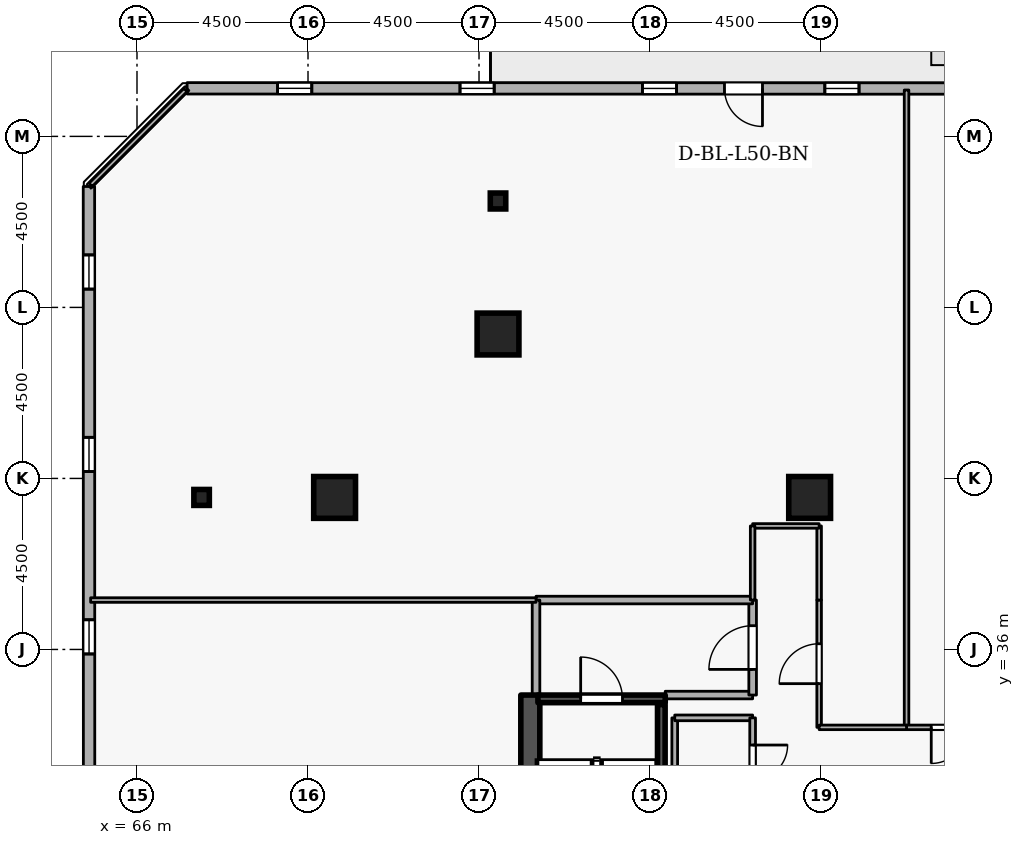
"""IFC4 building model, lengths in metres.
Left out: names, types, materials, properties, quantities, classifications, styles, units other than length and angle.
Written with IfcOpenShell. Run it as: python <this file> out.ifc"""

import sys

from ifc_helpers import new_model, si_unit, direction, frame, frame_2d, origin, origin_2d, place, context, subcontext, project, spatial, rectangle, i_section, extrude, element, fill, save


model = new_model("IFC4")
c1 = context("Model", 3, precision=1e-05, world=origin(), true_north=direction((0.0, 1.0)))
c2 = subcontext(c1, "Body", "Model", "MODEL_VIEW")
j1 = project(units=[si_unit("LENGTHUNIT", "METRE"), si_unit("PLANEANGLEUNIT", "RADIAN")], contexts=[c1])
p1 = place(None, origin())
s1 = spatial("IfcSite", under=j1, at=p1, CompositionType="ELEMENT")
p2 = place(p1, origin())
s2 = spatial("IfcBuilding", under=s1, at=p2, CompositionType="ELEMENT")
p3 = place(p2, frame((0.0, 0.0, 189.3)))
s3 = spatial("IfcBuildingStorey", under=s2, at=p3, CompositionType="ELEMENT", Elevation=189.3)
p4 = place(p3, frame((76.35, 19.2, 0.0), z_axis=(0.0, 0.0, 1.0), x_axis=(0.0, 1.0, 0.0)))
e1 = element("IfcWall", 1, at=p4, inside=s3, PredefinedType="SHEAR", context=c2, shape_type="SweptSolid", body=[
    extrude(rectangle(XDim=15.6, YDim=0.5, at=frame_2d((7.8, 0.0))), origin(), (0.0, 0.0, 1.0), 3.6),
])
for number, where, z_axis, x_axis in (
    (2, (75.5, 44.3, 0.0), (0.0, 0.0, 1.0), (1.0, 0.0, 0.0)),
    (3, (71.2, 40.0, 0.0), (0.0, 0.0, 1.0), (1.0, 0.0, 0.0)),
    (4, (83.7, 40.0, 0.0), (0.0, 0.0, 1.0), (1.0, 0.0, 0.0)),
):
    element("IfcColumn", number, at=place(p3, frame(where, z_axis=z_axis, x_axis=x_axis)), inside=s3, PredefinedType="COLUMN", context=c2, shape_type="SweptSolid", body=[
        extrude(rectangle(XDim=1.1, YDim=1.1, at=origin_2d()), origin(), (0.0, 0.0, 1.0), 3.6),
    ])
for number, where, z_axis, x_axis in (
    (5, (75.5, 47.8, 0.0), (0.0, 0.0, 1.0), (1.0, 0.0, 0.0)),
    (6, (67.7, 40.0, 0.0), (0.0, 0.0, 1.0), (1.0, 0.0, 0.0)),
):
    element("IfcColumn", number, at=place(p3, frame(where, z_axis=z_axis, x_axis=x_axis)), inside=s3, PredefinedType="COLUMN", context=c2, shape_type="SweptSolid", body=[
        extrude(i_section(OverallWidth=0.407, OverallDepth=0.419, WebThickness=0.031, FlangeThickness=0.049, FilletRadius=0.015, at=origin_2d()), origin(), (0.0, 0.0, 1.0), 3.6),
    ])
p5 = place(p3, frame((101.199, 50.756, 0.0), z_axis=(0.0, 0.0, 1.0), x_axis=(-0.999999969988, 0.000244999128, 0.0)))
e7 = element("IfcWall", 7, at=p5, inside=s3, PredefinedType="STANDARD", context=c2, shape_type="SweptSolid", body=[
    extrude(rectangle(XDim=33.881, YDim=0.3, at=frame_2d((16.94, 0.0))), origin(), (0.0, 0.0, 1.0), 2.7),
])
p6 = place(p5, frame((18.74, 0.0, 0.0)))
e8 = element("IfcOpeningElement", 8, at=p6, cuts=e7, PredefinedType="OPENING", context=c2, shape_type="SweptSolid", body=[
    extrude(rectangle(XDim=1.0, YDim=2.08, at=frame_2d((0.5, 1.04))), frame((0.0, 0.16, 0.0), z_axis=(0.0, -1.0, 0.0), x_axis=(1.0, 0.0, 0.0)), (0.0, 0.0, 1.0), 0.32),
])
p7 = place(p5, frame((1.8, 0.0, 0.72)))
e9 = element("IfcOpeningElement", 9, at=p7, cuts=e7, PredefinedType="OPENING", context=c2, shape_type="SweptSolid", body=[
    extrude(rectangle(XDim=0.9, YDim=1.75, at=frame_2d((0.45, 0.875))), frame((0.0, 0.16, 0.0), z_axis=(0.0, -1.0, 0.0), x_axis=(1.0, 0.0, 0.0)), (0.0, 0.0, 1.0), 0.32),
])
p8 = place(p5, frame((6.6, 0.0, 0.72)))
e10 = element("IfcOpeningElement", 10, at=p8, cuts=e7, PredefinedType="OPENING", context=c2, shape_type="SweptSolid", body=[
    extrude(rectangle(XDim=0.9, YDim=1.75, at=frame_2d((0.45, 0.875))), frame((0.0, 0.16, 0.0), z_axis=(0.0, -1.0, 0.0), x_axis=(1.0, 0.0, 0.0)), (0.0, 0.0, 1.0), 0.32),
])
p9 = place(p5, frame((11.4, 0.0, 0.72)))
e11 = element("IfcOpeningElement", 11, at=p9, cuts=e7, PredefinedType="OPENING", context=c2, shape_type="SweptSolid", body=[
    extrude(rectangle(XDim=0.9, YDim=1.75, at=frame_2d((0.45, 0.875))), frame((0.0, 0.16, 0.0), z_axis=(0.0, -1.0, 0.0), x_axis=(1.0, 0.0, 0.0)), (0.0, 0.0, 1.0), 0.32),
])
p10 = place(p5, frame((16.2, 0.0, 0.72)))
e12 = element("IfcOpeningElement", 12, at=p10, cuts=e7, PredefinedType="OPENING", context=c2, shape_type="SweptSolid", body=[
    extrude(rectangle(XDim=0.9, YDim=1.75, at=frame_2d((0.45, 0.875))), frame((0.0, 0.16, 0.0), z_axis=(0.0, -1.0, 0.0), x_axis=(1.0, 0.0, 0.0)), (0.0, 0.0, 1.0), 0.32),
])
p11 = place(p5, frame((21.0, 0.0, 0.72)))
e13 = element("IfcOpeningElement", 13, at=p11, cuts=e7, PredefinedType="OPENING", context=c2, shape_type="SweptSolid", body=[
    extrude(rectangle(XDim=0.9, YDim=1.75, at=frame_2d((0.45, 0.875))), frame((0.0, 0.16, 0.0), z_axis=(0.0, -1.0, 0.0), x_axis=(1.0, 0.0, 0.0)), (0.0, 0.0, 1.0), 0.32),
])
p12 = place(p5, frame((25.8, 0.0, 0.72)))
e14 = element("IfcOpeningElement", 14, at=p12, cuts=e7, PredefinedType="OPENING", context=c2, shape_type="SweptSolid", body=[
    extrude(rectangle(XDim=0.9, YDim=1.75, at=frame_2d((0.45, 0.875))), frame((0.0, 0.16, 0.0), z_axis=(0.0, -1.0, 0.0), x_axis=(1.0, 0.0, 0.0)), (0.0, 0.0, 1.0), 0.32),
])
p13 = place(p5, frame((30.6, 0.0, 0.72)))
e15 = element("IfcOpeningElement", 15, at=p13, cuts=e7, PredefinedType="OPENING", context=c2, shape_type="SweptSolid", body=[
    extrude(rectangle(XDim=0.9, YDim=1.75, at=frame_2d((0.45, 0.875))), frame((0.0, 0.16, 0.0), z_axis=(0.0, -1.0, 0.0), x_axis=(1.0, 0.0, 0.0)), (0.0, 0.0, 1.0), 0.32),
])
p14 = place(p3, frame((64.735, 48.181, 0.0), z_axis=(0.0, 0.0, 1.0), x_axis=(0.000244999128, -0.999999969988, 0.0)))
e16 = element("IfcWall", 16, at=p14, inside=s3, PredefinedType="STANDARD", context=c2, shape_type="SweptSolid", body=[
    extrude(rectangle(XDim=33.881, YDim=0.3, at=frame_2d((16.94, 0.0))), origin(), (0.0, 0.0, 1.0), 2.7),
])
p15 = place(p14, frame((1.8, 0.0, 0.72)))
e17 = element("IfcOpeningElement", 17, at=p15, cuts=e16, PredefinedType="OPENING", context=c2, shape_type="SweptSolid", body=[
    extrude(rectangle(XDim=0.9, YDim=1.75, at=frame_2d((0.45, 0.875))), frame((0.0, 0.16, 0.0), z_axis=(0.0, -1.0, 0.0), x_axis=(1.0, 0.0, 0.0)), (0.0, 0.0, 1.0), 0.32),
])
p16 = place(p14, frame((6.6, 0.0, 0.72)))
e18 = element("IfcOpeningElement", 18, at=p16, cuts=e16, PredefinedType="OPENING", context=c2, shape_type="SweptSolid", body=[
    extrude(rectangle(XDim=0.9, YDim=1.75, at=frame_2d((0.45, 0.875))), frame((0.0, 0.16, 0.0), z_axis=(0.0, -1.0, 0.0), x_axis=(1.0, 0.0, 0.0)), (0.0, 0.0, 1.0), 0.32),
])
p17 = place(p14, frame((11.4, 0.0, 0.72)))
e19 = element("IfcOpeningElement", 19, at=p17, cuts=e16, PredefinedType="OPENING", context=c2, shape_type="SweptSolid", body=[
    extrude(rectangle(XDim=0.9, YDim=1.75, at=frame_2d((0.45, 0.875))), frame((0.0, 0.16, 0.0), z_axis=(0.0, -1.0, 0.0), x_axis=(1.0, 0.0, 0.0)), (0.0, 0.0, 1.0), 0.32),
])
p18 = place(p14, frame((16.2, 0.0, 0.72)))
e20 = element("IfcOpeningElement", 20, at=p18, cuts=e16, PredefinedType="OPENING", context=c2, shape_type="SweptSolid", body=[
    extrude(rectangle(XDim=0.9, YDim=1.75, at=frame_2d((0.45, 0.875))), frame((0.0, 0.16, 0.0), z_axis=(0.0, -1.0, 0.0), x_axis=(1.0, 0.0, 0.0)), (0.0, 0.0, 1.0), 0.32),
])
p19 = place(p14, frame((21.0, 0.0, 0.72)))
e21 = element("IfcOpeningElement", 21, at=p19, cuts=e16, PredefinedType="OPENING", context=c2, shape_type="SweptSolid", body=[
    extrude(rectangle(XDim=0.9, YDim=1.75, at=frame_2d((0.45, 0.875))), frame((0.0, 0.16, 0.0), z_axis=(0.0, -1.0, 0.0), x_axis=(1.0, 0.0, 0.0)), (0.0, 0.0, 1.0), 0.32),
])
p20 = place(p14, frame((25.8, 0.0, 0.72)))
e22 = element("IfcOpeningElement", 22, at=p20, cuts=e16, PredefinedType="OPENING", context=c2, shape_type="SweptSolid", body=[
    extrude(rectangle(XDim=0.9, YDim=1.75, at=frame_2d((0.45, 0.875))), frame((0.0, 0.16, 0.0), z_axis=(0.0, -1.0, 0.0), x_axis=(1.0, 0.0, 0.0)), (0.0, 0.0, 1.0), 0.32),
])
p21 = place(p14, frame((30.6, 0.0, 0.72)))
e23 = element("IfcOpeningElement", 23, at=p21, cuts=e16, PredefinedType="OPENING", context=c2, shape_type="SweptSolid", body=[
    extrude(rectangle(XDim=0.9, YDim=1.75, at=frame_2d((0.45, 0.875))), frame((0.0, 0.16, 0.0), z_axis=(0.0, -1.0, 0.0), x_axis=(1.0, 0.0, 0.0)), (0.0, 0.0, 1.0), 0.32),
])
p22 = place(p3, frame((76.55, 34.7, 0.0), z_axis=(0.0, 0.0, 1.0), x_axis=(1.0, 0.0, 0.0)))
e24 = element("IfcWall", 24, at=p22, inside=s3, PredefinedType="SHEAR", context=c2, shape_type="SweptSolid", body=[
    extrude(rectangle(XDim=3.35, YDim=0.2, at=frame_2d((1.675, 0.0))), origin(), (0.0, 0.0, 1.0), 3.6),
])
p23 = place(p22, frame((1.125, 0.0, 0.0)))
e25 = element("IfcOpeningElement", 25, at=p23, cuts=e24, PredefinedType="OPENING", context=c2, shape_type="SweptSolid", body=[
    extrude(rectangle(XDim=1.1, YDim=2.1, at=frame_2d((0.55, 1.05))), frame((0.0, 0.11, 0.0), z_axis=(0.0, -1.0, 0.0), x_axis=(1.0, 0.0, 0.0)), (0.0, 0.0, 1.0), 0.22),
])
p24 = place(p3, frame((79.797, 27.45, 0.0), z_axis=(0.0, 0.0, 1.0), x_axis=(0.0, 1.0, 0.0)))
e26 = element("IfcWall", 26, at=p24, inside=s3, PredefinedType="SHEAR", context=c2, shape_type="SweptSolid", body=[
    extrude(rectangle(XDim=7.1, YDim=0.2, at=frame_2d((3.55, 0.0))), origin(), (0.0, 0.0, 1.0), 3.6),
])
p25 = place(p3, frame((79.9, 34.8, 0.0), z_axis=(0.0, 0.0, 1.0), x_axis=(1.0, 0.0, 0.0)))
e27 = element("IfcWall", 27, at=p25, inside=s3, PredefinedType="STANDARD", context=c2, shape_type="SweptSolid", body=[
    extrude(rectangle(XDim=2.3, YDim=0.2, at=frame_2d((1.15, 0.0))), origin(), (0.0, 0.0, 1.0), 2.545),
])
p26 = place(p3, frame((82.2, 34.8, 0.0), z_axis=(0.0, 0.0, 1.0), x_axis=(0.0, 1.0, 0.0)))
e28 = element("IfcWall", 28, at=p26, inside=s3, PredefinedType="STANDARD", context=c2, shape_type="SweptSolid", body=[
    extrude(rectangle(XDim=2.5, YDim=0.2, at=frame_2d((1.25, 0.0))), origin(), (0.0, 0.0, 1.0), 3.34),
])
p27 = place(p26, frame((0.675, 0.0, 0.0)))
e29 = element("IfcOpeningElement", 29, at=p27, cuts=e28, PredefinedType="OPENING", context=c2, shape_type="SweptSolid", body=[
    extrude(rectangle(XDim=1.15, YDim=2.1, at=frame_2d((0.575, 1.05))), frame((0.0, 0.11, 0.0), z_axis=(0.0, -1.0, 0.0), x_axis=(1.0, 0.0, 0.0)), (0.0, 0.0, 1.0), 0.22),
])
p28 = place(p3, frame((82.2, 37.3, 0.0), z_axis=(0.0, 0.0, 1.0), x_axis=(-1.0, 0.0, 0.0)))
e30 = element("IfcWall", 30, at=p28, inside=s3, PredefinedType="STANDARD", context=c2, shape_type="SweptSolid", body=[
    extrude(rectangle(XDim=5.7, YDim=0.2, at=frame_2d((2.85, 0.0))), origin(), (0.0, 0.0, 1.0), 3.34),
])
p29 = place(p3, frame((76.5, 37.3, 0.0), z_axis=(0.0, 0.0, 1.0), x_axis=(0.0, -1.0, 0.0)))
e31 = element("IfcWall", 31, at=p29, inside=s3, PredefinedType="STANDARD", context=c2, shape_type="SweptSolid", body=[
    extrude(rectangle(XDim=2.5, YDim=0.2, at=frame_2d((1.25, 0.0))), origin(), (0.0, 0.0, 1.0), 3.34),
])
p30 = place(p3, frame((80.15, 31.85, 0.0), z_axis=(0.0, 0.0, 1.0), x_axis=(0.0, 1.0, 0.0)))
e32 = element("IfcWall", 32, at=p30, inside=s3, PredefinedType="PARTITIONING", context=c2, shape_type="SweptSolid", body=[
    extrude(rectangle(XDim=2.35, YDim=0.15, at=frame_2d((1.175, 0.0))), origin(), (0.0, 0.0, 1.0), 3.34),
])
p31 = place(p3, frame((80.15, 34.2, 0.0), z_axis=(0.0, 0.0, 1.0), x_axis=(1.0, 0.0, 0.0)))
e33 = element("IfcWall", 33, at=p31, inside=s3, PredefinedType="PARTITIONING", context=c2, shape_type="SweptSolid", body=[
    extrude(rectangle(XDim=2.05, YDim=0.15, at=frame_2d((1.025, 0.0))), origin(), (0.0, 0.0, 1.0), 2.545),
])
p32 = place(p3, frame((82.2, 34.2, 0.0), z_axis=(0.0, 0.0, 1.0), x_axis=(0.0, -1.0, 0.0)))
e34 = element("IfcWall", 34, at=p32, inside=s3, PredefinedType="PARTITIONING", context=c2, shape_type="SweptSolid", body=[
    extrude(rectangle(XDim=2.35, YDim=0.15, at=frame_2d((1.175, 0.0))), origin(), (0.0, 0.0, 1.0), 3.34),
])
p33 = place(p32, frame((0.715, 0.0, 0.0)))
e35 = element("IfcOpeningElement", 35, at=p33, cuts=e34, PredefinedType="OPENING", context=c2, shape_type="SweptSolid", body=[
    extrude(rectangle(XDim=0.92, YDim=2.08, at=frame_2d((0.46, 1.04))), frame((0.0, 0.085, 0.0), z_axis=(0.0, -1.0, 0.0), x_axis=(1.0, 0.0, 0.0)), (0.0, 0.0, 1.0), 0.17),
])
p34 = place(p3, frame((86.25, 33.95, 0.0), z_axis=(0.0, 0.0, 1.0), x_axis=(0.0, 1.0, 0.0)))
e36 = element("IfcWall", 36, at=p34, inside=s3, PredefinedType="PARTITIONING", context=c2, shape_type="SweptSolid", body=[
    extrude(rectangle(XDim=16.77, YDim=0.12, at=frame_2d((8.385, 0.0))), origin(), (0.0, 0.0, 1.0), 3.34),
])
p35 = place(p3, frame((88.5, 33.95, 0.0), z_axis=(0.0, 0.0, 1.0), x_axis=(-1.0, 0.0, 0.0)))
e37 = element("IfcWall", 37, at=p35, inside=s3, PredefinedType="PARTITIONING", context=c2, shape_type="SweptSolid", body=[
    extrude(rectangle(XDim=2.25, YDim=0.12, at=frame_2d((1.125, 0.0))), origin(), (0.0, 0.0, 1.0), 3.34),
])
p36 = place(p35, frame((0.65, 0.0, 0.0)))
e38 = element("IfcOpeningElement", 38, at=p36, cuts=e37, PredefinedType="OPENING", context=c2, shape_type="SweptSolid", body=[
    extrude(rectangle(XDim=0.95, YDim=2.1, at=frame_2d((0.475, 1.05))), frame((0.0, 0.07, 0.0), z_axis=(0.0, -1.0, 0.0), x_axis=(1.0, 0.0, 0.0)), (0.0, 0.0, 1.0), 0.14),
])
p37 = place(p3, frame((83.95, 33.95, 0.0), z_axis=(0.0, 0.0, 1.0), x_axis=(0.0, 1.0, 0.0)))
e39 = element("IfcWall", 39, at=p37, inside=s3, PredefinedType="PARTITIONING", context=c2, shape_type="SweptSolid", body=[
    extrude(rectangle(XDim=3.35, YDim=0.12, at=frame_2d((1.675, 0.0))), origin(), (0.0, 0.0, 1.0), 3.34),
])
p38 = place(p37, frame((1.15, 0.0, 0.0)))
e40 = element("IfcOpeningElement", 40, at=p38, cuts=e39, PredefinedType="OPENING", context=c2, shape_type="SweptSolid", body=[
    extrude(rectangle(XDim=1.05, YDim=2.1, at=frame_2d((0.525, 1.05))), frame((0.0, 0.07, 0.0), z_axis=(0.0, -1.0, 0.0), x_axis=(1.0, 0.0, 0.0)), (0.0, 0.0, 1.0), 0.14),
])
p39 = place(p3, frame((83.95, 37.3, 0.0), z_axis=(0.0, 0.0, 1.0), x_axis=(0.0, 1.0, 0.0)))
e41 = element("IfcWall", 41, at=p39, inside=s3, PredefinedType="PARTITIONING", context=c2, shape_type="SweptSolid", body=[
    extrude(rectangle(XDim=1.95, YDim=0.12, at=frame_2d((0.975, 0.0))), origin(), (0.0, 0.0, 1.0), 3.34),
])
p40 = place(p3, frame((83.95, 39.25, 0.0), z_axis=(0.0, 0.0, 1.0), x_axis=(-1.0, 0.0, 0.0)))
e42 = element("IfcWall", 42, at=p40, inside=s3, PredefinedType="PARTITIONING", context=c2, shape_type="SweptSolid", body=[
    extrude(rectangle(XDim=1.75, YDim=0.12, at=frame_2d((0.875, 0.0))), origin(), (0.0, 0.0, 1.0), 3.34),
])
p41 = place(p3, frame((82.2, 39.25, 0.0), z_axis=(0.0, 0.0, 1.0), x_axis=(0.0, -1.0, 0.0)))
e43 = element("IfcWall", 43, at=p41, inside=s3, PredefinedType="PARTITIONING", context=c2, shape_type="SweptSolid", body=[
    extrude(rectangle(XDim=1.95, YDim=0.12, at=frame_2d((0.975, 0.0))), origin(), (0.0, 0.0, 1.0), 3.34),
])
p42 = place(p3, frame((76.5, 37.3, 0.0), z_axis=(0.0, 0.0, 1.0), x_axis=(-1.0, 0.0, 0.0)))
e44 = element("IfcWall", 44, at=p42, inside=s3, PredefinedType="PARTITIONING", context=c2, shape_type="SweptSolid", body=[
    extrude(rectangle(XDim=11.72, YDim=0.12, at=frame_2d((5.86, 0.0))), origin(), (0.0, 0.0, 1.0), 3.34),
])
p43 = place(p3, frame((64.78, 48.225, 0.0), z_axis=(0.0, 0.0, 1.0), x_axis=(0.707106781187, 0.707106781187, 0.0)))
e45 = element("IfcWall", 45, at=p43, inside=s3, PredefinedType="PARTITIONING", context=c2, shape_type="SweptSolid", body=[
    extrude(rectangle(XDim=3.528, YDim=0.12, at=frame_2d((1.764, 0.0))), origin(), (0.0, 0.0, 1.0), 3.34),
])
p44 = place(p3, frame((86.25, 33.95, 0.0), z_axis=(0.0, 0.0, 1.0), x_axis=(-1.0, 0.0, 0.0)))
e46 = element("IfcWall", 46, at=p44, inside=s3, PredefinedType="PARTITIONING", context=c2, shape_type="SweptSolid", body=[
    extrude(rectangle(XDim=2.3, YDim=0.12, at=frame_2d((1.15, 0.0))), origin(), (0.0, 0.0, 1.0), 3.34),
])
p45 = place(p6, origin())
e47 = element("IfcDoor", 47, at=p45, inside=s3, OperationType="SINGLE_SWING_LEFT", PredefinedType="DOOR", context=c2, shape_type="SweptSolid", body=[
    extrude(rectangle(XDim=1.0, YDim=2.08, at=frame_2d((0.5, 1.04))), frame((0.0, 0.025, 0.0), z_axis=(0.0, -1.0, 0.0), x_axis=(1.0, 0.0, 0.0)), (0.0, 0.0, 1.0), 0.05),
])
fill(e8, e47)
p46 = place(p10, origin())
e48 = element("IfcWindow", 48, at=p46, inside=s3, PartitioningType="SINGLE_PANEL", PredefinedType="WINDOW", context=c2, shape_type="SweptSolid", body=[
    extrude(rectangle(XDim=0.9, YDim=1.75, at=frame_2d((0.45, 0.875))), frame((0.0, 0.03, 0.0), z_axis=(0.0, -1.0, 0.0), x_axis=(1.0, 0.0, 0.0)), (0.0, 0.0, 1.0), 0.06),
])
fill(e12, e48)
p47 = place(p11, origin())
e49 = element("IfcWindow", 49, at=p47, inside=s3, PartitioningType="SINGLE_PANEL", PredefinedType="WINDOW", context=c2, shape_type="SweptSolid", body=[
    extrude(rectangle(XDim=0.9, YDim=1.75, at=frame_2d((0.45, 0.875))), frame((0.0, 0.03, 0.0), z_axis=(0.0, -1.0, 0.0), x_axis=(1.0, 0.0, 0.0)), (0.0, 0.0, 1.0), 0.06),
])
fill(e13, e49)
p48 = place(p12, origin())
e50 = element("IfcWindow", 50, at=p48, inside=s3, PartitioningType="SINGLE_PANEL", PredefinedType="WINDOW", context=c2, shape_type="SweptSolid", body=[
    extrude(rectangle(XDim=0.9, YDim=1.75, at=frame_2d((0.45, 0.875))), frame((0.0, 0.03, 0.0), z_axis=(0.0, -1.0, 0.0), x_axis=(1.0, 0.0, 0.0)), (0.0, 0.0, 1.0), 0.06),
])
fill(e14, e50)
p49 = place(p13, origin())
e51 = element("IfcWindow", 51, at=p49, inside=s3, PartitioningType="SINGLE_PANEL", PredefinedType="WINDOW", context=c2, shape_type="SweptSolid", body=[
    extrude(rectangle(XDim=0.9, YDim=1.75, at=frame_2d((0.45, 0.875))), frame((0.0, 0.03, 0.0), z_axis=(0.0, -1.0, 0.0), x_axis=(1.0, 0.0, 0.0)), (0.0, 0.0, 1.0), 0.06),
])
fill(e15, e51)
p50 = place(p15, origin())
e52 = element("IfcWindow", 52, at=p50, inside=s3, PartitioningType="SINGLE_PANEL", PredefinedType="WINDOW", context=c2, shape_type="SweptSolid", body=[
    extrude(rectangle(XDim=0.9, YDim=1.75, at=frame_2d((0.45, 0.875))), frame((0.0, 0.03, 0.0), z_axis=(0.0, -1.0, 0.0), x_axis=(1.0, 0.0, 0.0)), (0.0, 0.0, 1.0), 0.06),
])
fill(e17, e52)
p51 = place(p16, origin())
e53 = element("IfcWindow", 53, at=p51, inside=s3, PartitioningType="SINGLE_PANEL", PredefinedType="WINDOW", context=c2, shape_type="SweptSolid", body=[
    extrude(rectangle(XDim=0.9, YDim=1.75, at=frame_2d((0.45, 0.875))), frame((0.0, 0.03, 0.0), z_axis=(0.0, -1.0, 0.0), x_axis=(1.0, 0.0, 0.0)), (0.0, 0.0, 1.0), 0.06),
])
fill(e18, e53)
p52 = place(p17, origin())
e54 = element("IfcWindow", 54, at=p52, inside=s3, PartitioningType="SINGLE_PANEL", PredefinedType="WINDOW", context=c2, shape_type="SweptSolid", body=[
    extrude(rectangle(XDim=0.9, YDim=1.75, at=frame_2d((0.45, 0.875))), frame((0.0, 0.03, 0.0), z_axis=(0.0, -1.0, 0.0), x_axis=(1.0, 0.0, 0.0)), (0.0, 0.0, 1.0), 0.06),
])
fill(e19, e54)
p53 = place(p23, origin())
e55 = element("IfcDoor", 55, at=p53, inside=s3, OperationType="SINGLE_SWING_LEFT", PredefinedType="DOOR", context=c2, shape_type="SweptSolid", body=[
    extrude(rectangle(XDim=1.1, YDim=2.1, at=frame_2d((0.55, 1.05))), frame((0.0, 0.025, 0.0), z_axis=(0.0, -1.0, 0.0), x_axis=(1.0, 0.0, 0.0)), (0.0, 0.0, 1.0), 0.05),
])
fill(e25, e55)
p54 = place(p27, origin())
e56 = element("IfcDoor", 56, at=p54, inside=s3, OperationType="SINGLE_SWING_LEFT", PredefinedType="DOOR", context=c2, shape_type="SweptSolid", body=[
    extrude(rectangle(XDim=1.15, YDim=2.1, at=frame_2d((0.575, 1.05))), frame((0.0, 0.025, 0.0), z_axis=(0.0, -1.0, 0.0), x_axis=(1.0, 0.0, 0.0)), (0.0, 0.0, 1.0), 0.05),
])
fill(e29, e56)
p55 = place(p33, origin())
e57 = element("IfcDoor", 57, at=p55, inside=s3, OperationType="SINGLE_SWING_LEFT", PredefinedType="DOOR", context=c2, shape_type="SweptSolid", body=[
    extrude(rectangle(XDim=0.92, YDim=2.08, at=frame_2d((0.46, 1.04))), frame((0.0, 0.025, 0.0), z_axis=(0.0, -1.0, 0.0), x_axis=(1.0, 0.0, 0.0)), (0.0, 0.0, 1.0), 0.05),
])
fill(e35, e57)
p56 = place(p36, origin())
e58 = element("IfcDoor", 58, at=p56, inside=s3, OperationType="SINGLE_SWING_RIGHT", PredefinedType="DOOR", context=c2, shape_type="SweptSolid", body=[
    extrude(rectangle(XDim=0.95, YDim=2.1, at=frame_2d((0.475, 1.05))), frame((0.0, 0.025, 0.0), z_axis=(0.0, -1.0, 0.0), x_axis=(1.0, 0.0, 0.0)), (0.0, 0.0, 1.0), 0.05),
])
fill(e38, e58)
p57 = place(p38, origin())
e59 = element("IfcDoor", 59, at=p57, inside=s3, OperationType="SINGLE_SWING_LEFT", PredefinedType="DOOR", context=c2, shape_type="SweptSolid", body=[
    extrude(rectangle(XDim=1.05, YDim=2.1, at=frame_2d((0.525, 1.05))), frame((0.0, 0.025, 0.0), z_axis=(0.0, -1.0, 0.0), x_axis=(1.0, 0.0, 0.0)), (0.0, 0.0, 1.0), 0.05),
])
fill(e40, e59)
save(model, sys.argv[1])
